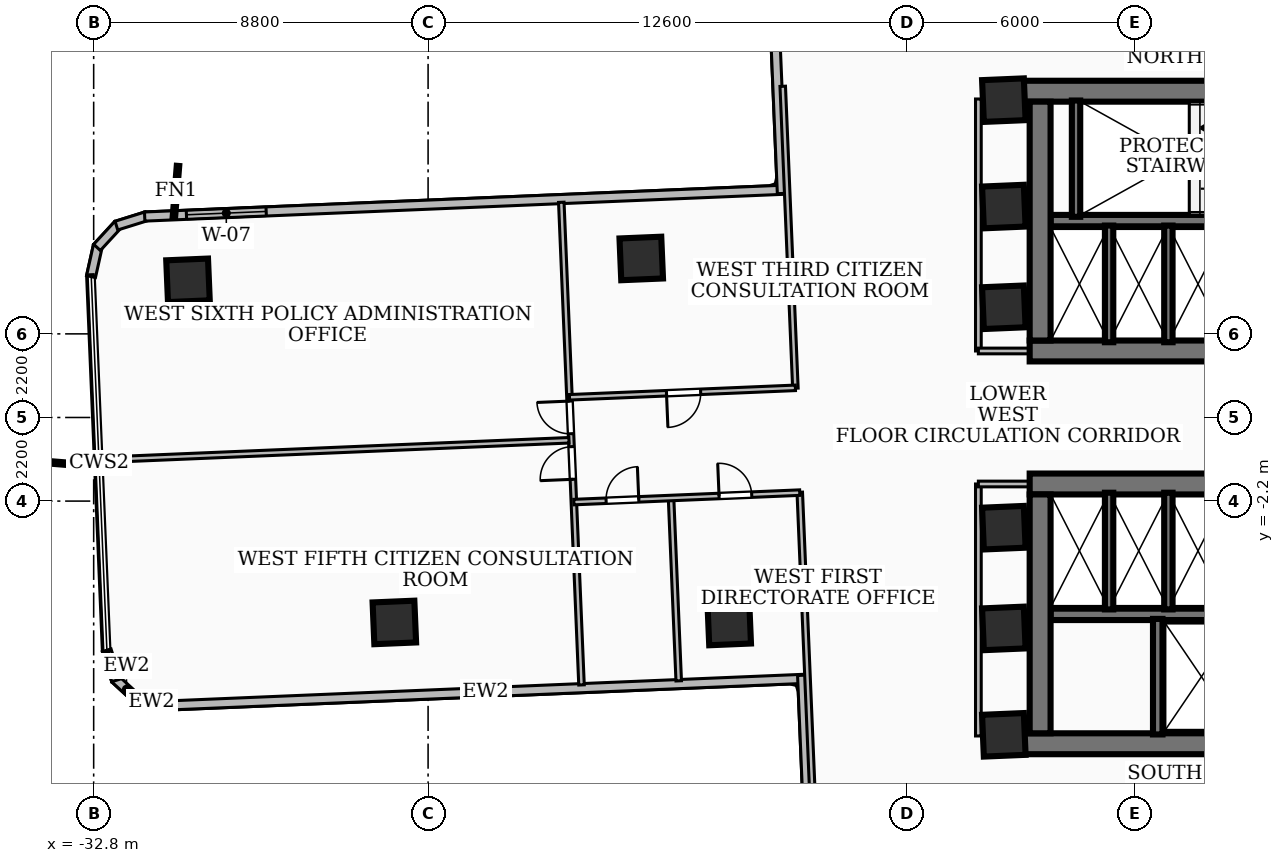
"""IFC4 building model, lengths in metres.
Left out: names, types, materials, properties, quantities, classifications, styles, units other than length and angle.
Written with IfcOpenShell. Run it as: python <this file> out.ifc"""

import sys

from ifc_helpers import new_model, si_unit, direction, frame, frame_2d, origin, origin_2d, place, context, subcontext, project, spatial, rectangle, extrude, element, fill, save


model = new_model("IFC4")
c1 = context("Model", 3, precision=1e-05, world=origin(), true_north=direction((0.0, 1.0)))
c2 = subcontext(c1, "Body", "Model", "MODEL_VIEW")
j1 = project(units=[si_unit("LENGTHUNIT", "METRE"), si_unit("PLANEANGLEUNIT", "RADIAN")], contexts=[c1])
p1 = place(None, origin())
s1 = spatial("IfcSite", under=j1, at=p1, CompositionType="ELEMENT")
p2 = place(p1, origin())
s2 = spatial("IfcBuilding", under=s1, at=p2, CompositionType="ELEMENT")
p3 = place(p2, frame((0.0, 0.0, 46.08)))
s3 = spatial("IfcBuildingStorey", under=s2, at=p3, CompositionType="ELEMENT", Elevation=46.08)
p4 = place(p3, frame((-8.78, 8.585, 0.0), z_axis=(0.0, 0.0, 1.0), x_axis=(1.0, 0.0, 0.0)))
e1 = element("IfcWall", 1, at=p4, inside=s3, PredefinedType="SHEAR", context=c2, shape_type="SweptSolid", body=[
    extrude(rectangle(XDim=17.56, YDim=0.55, at=frame_2d((8.78, 0.0))), origin(), (0.0, 0.0, 1.0), 3.32),
])
p5 = place(p3, frame((8.17, 1.75, 0.0), z_axis=(0.0, 0.0, 1.0), x_axis=(-1.0, 0.0, 0.0)))
e2 = element("IfcWall", 2, at=p5, inside=s3, PredefinedType="SHEAR", context=c2, shape_type="SweptSolid", body=[
    extrude(rectangle(XDim=16.34, YDim=0.55, at=frame_2d((8.17, 0.0))), origin(), (0.0, 0.0, 1.0), 3.32),
])
p6 = place(p5, frame((7.45, 0.0, 0.0)))
e3 = element("IfcOpeningElement", 3, at=p6, cuts=e2, PredefinedType="OPENING", context=c2, shape_type="SweptSolid", body=[
    extrude(rectangle(XDim=1.0, YDim=2.1, at=frame_2d((0.5, 1.05))), frame((0.0, 0.285, 0.0), z_axis=(0.0, -1.0, 0.0), x_axis=(1.0, 0.0, 0.0)), (0.0, 0.0, 1.0), 0.57),
])
p7 = place(p5, frame((3.4, 0.0, 0.0)))
e4 = element("IfcOpeningElement", 4, at=p7, cuts=e2, PredefinedType="OPENING", context=c2, shape_type="SweptSolid", body=[
    extrude(rectangle(XDim=0.9, YDim=2.06, at=frame_2d((0.45, 1.03))), frame((0.0, 0.285, 0.0), z_axis=(0.0, -1.0, 0.0), x_axis=(1.0, 0.0, 0.0)), (0.0, 0.0, 1.0), 0.57),
])
p8 = place(p5, frame((1.1, 0.0, 0.0)))
e5 = element("IfcOpeningElement", 5, at=p8, cuts=e2, PredefinedType="OPENING", context=c2, shape_type="SweptSolid", body=[
    extrude(rectangle(XDim=0.9, YDim=2.06, at=frame_2d((0.45, 1.03))), frame((0.0, 0.285, 0.0), z_axis=(0.0, -1.0, 0.0), x_axis=(1.0, 0.0, 0.0)), (0.0, 0.0, 1.0), 0.57),
])
p9 = place(p3, frame((-7.895, 2.025, 0.0), z_axis=(0.0, 0.0, 1.0), x_axis=(0.0, 1.0, 0.0)))
e6 = element("IfcWall", 6, at=p9, inside=s3, PredefinedType="SHEAR", context=c2, shape_type="SweptSolid", body=[
    extrude(rectangle(XDim=6.285, YDim=0.55, at=frame_2d((3.143, 0.0))), origin(), (0.0, 0.0, 1.0), 3.32),
])
p10 = place(p3, frame((7.62, 5.18, 0.0), z_axis=(0.0, 0.0, 1.0), x_axis=(-1.0, 0.0, 0.0)))
e7 = element("IfcWall", 7, at=p10, inside=s3, PredefinedType="SOLIDWALL", context=c2, shape_type="SweptSolid", body=[
    extrude(rectangle(XDim=15.24, YDim=0.3, at=frame_2d((7.62, 0.0))), origin(), (0.0, 0.0, 1.0), 3.32),
])
p11 = place(p10, frame((5.77, 0.0, 0.0)))
e8 = element("IfcOpeningElement", 8, at=p11, cuts=e7, PredefinedType="OPENING", context=c2, shape_type="SweptSolid", body=[
    extrude(rectangle(XDim=1.1, YDim=2.15, at=frame_2d((0.55, 1.075))), frame((0.0, 0.16, 0.0), z_axis=(0.0, -1.0, 0.0), x_axis=(1.0, 0.0, 0.0)), (0.0, 0.0, 1.0), 0.32),
])
p12 = place(p10, frame((2.97, 0.0, 0.0)))
e9 = element("IfcOpeningElement", 9, at=p12, cuts=e7, PredefinedType="OPENING", context=c2, shape_type="SweptSolid", body=[
    extrude(rectangle(XDim=1.1, YDim=2.15, at=frame_2d((0.55, 1.075))), frame((0.0, 0.16, 0.0), z_axis=(0.0, -1.0, 0.0), x_axis=(1.0, 0.0, 0.0)), (0.0, 0.0, 1.0), 0.32),
])
p13 = place(p10, frame((7.97, 0.0, 0.0)))
e10 = element("IfcOpeningElement", 10, at=p13, cuts=e7, PredefinedType="OPENING", context=c2, shape_type="SweptSolid", body=[
    extrude(rectangle(XDim=1.0, YDim=2.1, at=frame_2d((0.5, 1.05))), frame((0.0, 0.16, 0.0), z_axis=(0.0, -1.0, 0.0), x_axis=(1.0, 0.0, 0.0)), (0.0, 0.0, 1.0), 0.32),
])
p14 = place(p3, frame((8.78, -8.585, 0.0), z_axis=(0.0, 0.0, 1.0), x_axis=(-1.0, 0.0, 0.0)))
e11 = element("IfcWall", 11, at=p14, inside=s3, PredefinedType="SHEAR", context=c2, shape_type="SweptSolid", body=[
    extrude(rectangle(XDim=17.56, YDim=0.55, at=frame_2d((8.78, 0.0))), origin(), (0.0, 0.0, 1.0), 3.32),
])
p15 = place(p3, frame((-8.17, -1.75, 0.0), z_axis=(0.0, 0.0, 1.0), x_axis=(1.0, 0.0, 0.0)))
e12 = element("IfcWall", 12, at=p15, inside=s3, PredefinedType="SHEAR", context=c2, shape_type="SweptSolid", body=[
    extrude(rectangle(XDim=16.34, YDim=0.55, at=frame_2d((8.17, 0.0))), origin(), (0.0, 0.0, 1.0), 3.32),
])
p16 = place(p15, frame((7.45, 0.0, 0.0)))
e13 = element("IfcOpeningElement", 13, at=p16, cuts=e12, PredefinedType="OPENING", context=c2, shape_type="SweptSolid", body=[
    extrude(rectangle(XDim=1.0, YDim=2.1, at=frame_2d((0.5, 1.05))), frame((0.0, 0.285, 0.0), z_axis=(0.0, -1.0, 0.0), x_axis=(1.0, 0.0, 0.0)), (0.0, 0.0, 1.0), 0.57),
])
p17 = place(p15, frame((10.965, 0.0, 0.0)))
e14 = element("IfcOpeningElement", 14, at=p17, cuts=e12, PredefinedType="OPENING", context=c2, shape_type="SweptSolid", body=[
    extrude(rectangle(XDim=1.05, YDim=2.15, at=frame_2d((0.525, 1.075))), frame((0.0, 0.285, 0.0), z_axis=(0.0, -1.0, 0.0), x_axis=(1.0, 0.0, 0.0)), (0.0, 0.0, 1.0), 0.57),
])
p18 = place(p15, frame((12.525, 0.0, 0.0)))
e15 = element("IfcOpeningElement", 15, at=p18, cuts=e12, PredefinedType="OPENING", context=c2, shape_type="SweptSolid", body=[
    extrude(rectangle(XDim=1.05, YDim=2.15, at=frame_2d((0.525, 1.075))), frame((0.0, 0.285, 0.0), z_axis=(0.0, -1.0, 0.0), x_axis=(1.0, 0.0, 0.0)), (0.0, 0.0, 1.0), 0.57),
])
p19 = place(p15, frame((14.085, 0.0, 0.0)))
e16 = element("IfcOpeningElement", 16, at=p19, cuts=e12, PredefinedType="OPENING", context=c2, shape_type="SweptSolid", body=[
    extrude(rectangle(XDim=1.05, YDim=2.15, at=frame_2d((0.525, 1.075))), frame((0.0, 0.285, 0.0), z_axis=(0.0, -1.0, 0.0), x_axis=(1.0, 0.0, 0.0)), (0.0, 0.0, 1.0), 0.57),
])
p20 = place(p3, frame((-7.895, -8.31, 0.0), z_axis=(0.0, 0.0, 1.0), x_axis=(0.0, 1.0, 0.0)))
e17 = element("IfcWall", 17, at=p20, inside=s3, PredefinedType="SHEAR", context=c2, shape_type="SweptSolid", body=[
    extrude(rectangle(XDim=6.285, YDim=0.55, at=frame_2d((3.143, 0.0))), origin(), (0.0, 0.0, 1.0), 3.32),
])
p21 = place(p3, frame((-7.62, -5.18, 0.0), z_axis=(0.0, 0.0, 1.0), x_axis=(1.0, 0.0, 0.0)))
e18 = element("IfcWall", 18, at=p21, inside=s3, PredefinedType="SOLIDWALL", context=c2, shape_type="SweptSolid", body=[
    extrude(rectangle(XDim=15.24, YDim=0.3, at=frame_2d((7.62, 0.0))), origin(), (0.0, 0.0, 1.0), 3.32),
])
p22 = place(p21, frame((5.77, 0.0, 0.0)))
e19 = element("IfcOpeningElement", 19, at=p22, cuts=e18, PredefinedType="OPENING", context=c2, shape_type="SweptSolid", body=[
    extrude(rectangle(XDim=1.1, YDim=2.15, at=frame_2d((0.55, 1.075))), frame((0.0, 0.16, 0.0), z_axis=(0.0, -1.0, 0.0), x_axis=(1.0, 0.0, 0.0)), (0.0, 0.0, 1.0), 0.32),
])
p23 = place(p21, frame((7.97, 0.0, 0.0)))
e20 = element("IfcOpeningElement", 20, at=p23, cuts=e18, PredefinedType="OPENING", context=c2, shape_type="SweptSolid", body=[
    extrude(rectangle(XDim=1.0, YDim=2.1, at=frame_2d((0.5, 1.05))), frame((0.0, 0.16, 0.0), z_axis=(0.0, -1.0, 0.0), x_axis=(1.0, 0.0, 0.0)), (0.0, 0.0, 1.0), 0.32),
])
p24 = place(p3, frame((-6.95, 5.28, 0.0), z_axis=(0.0, 0.0, 1.0), x_axis=(0.0, 1.0, 0.0)))
e21 = element("IfcWall", 21, at=p24, inside=s3, PredefinedType="SOLIDWALL", context=c2, shape_type="SweptSolid", body=[
    extrude(rectangle(XDim=3.06, YDim=0.22, at=frame_2d((1.53, 0.0))), origin(), (0.0, 0.0, 1.0), 3.32),
])
p25 = place(p3, frame((-4.8, -8.34, 0.0), z_axis=(0.0, 0.0, 1.0), x_axis=(0.0, 1.0, 0.0)))
e22 = element("IfcWall", 22, at=p25, inside=s3, PredefinedType="SOLIDWALL", context=c2, shape_type="SweptSolid", body=[
    extrude(rectangle(XDim=3.04, YDim=0.25, at=frame_2d((1.52, 0.0))), origin(), (0.0, 0.0, 1.0), 3.32),
])
for number, where, z_axis, x_axis in (
    (23, (-6.08, 1.98, 0.0), (0.0, 0.0, 1.0), (0.0, 1.0, 0.0)),
    (24, (-4.52, 1.98, 0.0), (0.0, 0.0, 1.0), (0.0, 1.0, 0.0)),
    (25, (-6.08, -5.05, 0.0), (0.0, 0.0, 1.0), (0.0, 1.0, 0.0)),
    (26, (-4.52, -5.05, 0.0), (0.0, 0.0, 1.0), (0.0, 1.0, 0.0)),
):
    element("IfcWall", number, at=place(p3, frame(where, z_axis=z_axis, x_axis=x_axis)), inside=s3, PredefinedType="SOLIDWALL", context=c2, shape_type="SweptSolid", body=[
        extrude(rectangle(XDim=3.07, YDim=0.22, at=frame_2d((1.535, 0.0))), origin(), (0.0, 0.0, 1.0), 3.32),
    ])
for number, where, z_axis, x_axis in (
    (27, (-8.85, -5.55, 0.0), (0.0, 0.0, 1.0), (0.999, 0.042, 0.0)),
    (28, (-8.85, -2.9, 0.0), (0.0, 0.0, 1.0), (0.999, 0.042, 0.0)),
    (29, (-8.85, 2.9, 0.0), (0.0, 0.0, 1.0), (0.999, 0.042, 0.0)),
    (30, (-8.85, 5.55, 0.0), (0.0, 0.0, 1.0), (0.999, 0.042, 0.0)),
    (31, (-8.85, 8.35, 0.0), (0.0, 0.0, 1.0), (0.999, 0.042, 0.0)),
    (32, (-8.85, -8.35, 0.0), (0.0, 0.0, 1.0), (0.999, 0.042, 0.0)),
    (33, (-18.391, 4.184, 0.0), (0.0, 0.0, 1.0), (0.999, 0.042, 0.0)),
    (34, (-16.076, -5.421, 0.0), (0.0, 0.0, 1.0), (0.999, 0.042, 0.0)),
    (35, (-30.318, 3.609, 0.0), (0.0, 0.0, 1.0), (0.999, 0.042, 0.0)),
    (36, (-24.888, -5.393, 0.0), (0.0, 0.0, 1.0), (0.999, 0.042, 0.0)),
):
    element("IfcColumn", number, at=place(p3, frame(where, z_axis=z_axis, x_axis=x_axis)), inside=s3, PredefinedType="COLUMN", context=c2, shape_type="SweptSolid", body=[
        extrude(rectangle(XDim=1.1, YDim=1.1, at=origin_2d()), origin(), (0.0, 0.0, 1.0), 3.6),
    ])
p26 = place(p3, frame((-14.058, -6.875, 0.0), z_axis=(0.0, 0.0, 1.0), x_axis=(-0.999124376175, -0.04183874918, 0.0)))
e37 = element("IfcWall", 37, at=p26, inside=s3, PredefinedType="SOLIDWALL", context=c2, shape_type="SweptSolid", body=[
    extrude(rectangle(XDim=16.876, YDim=0.24, at=frame_2d((8.438, 0.0))), origin(), (0.0, 0.0, 1.0), 2.624),
])
p27 = place(p3, frame((-30.87, -7.585, 0.0), z_axis=(0.0, 0.0, 1.0), x_axis=(-0.976138507006, 0.217148831773, 0.0)))
e38 = element("IfcWall", 38, at=p27, inside=s3, PredefinedType="SOLIDWALL", context=c2, shape_type="SweptSolid", body=[
    extrude(rectangle(XDim=0.829, YDim=0.24, at=frame_2d((0.414, 0.0))), origin(), (0.0, 0.0, 1.0), 3.32),
])
p28 = place(p3, frame((-31.637, -7.427, 0.0), z_axis=(0.0, 0.0, 1.0), x_axis=(-0.73603262681, 0.676946063044, 0.0)))
e39 = element("IfcWall", 39, at=p28, inside=s3, PredefinedType="SOLIDWALL", context=c2, shape_type="SweptSolid", body=[
    extrude(rectangle(XDim=0.814, YDim=0.24, at=frame_2d((0.407, 0.0))), origin(), (0.0, 0.0, 1.0), 3.32),
])
p29 = place(p3, frame((-32.211, -6.917, 0.0), z_axis=(0.0, 0.0, 1.0), x_axis=(-0.297805793488, 0.954626476359, 0.0)))
e40 = element("IfcWall", 40, at=p29, inside=s3, PredefinedType="SOLIDWALL", context=c2, shape_type="SweptSolid", body=[
    extrude(rectangle(XDim=0.83, YDim=0.24, at=frame_2d((0.415, 0.0))), origin(), (0.0, 0.0, 1.0), 3.32),
])
p30 = place(p3, frame((-32.87, 3.707, 0.0), z_axis=(0.0, 0.0, 1.0), x_axis=(0.21711735544, 0.976145508604, 0.0)))
e41 = element("IfcWall", 41, at=p30, inside=s3, PredefinedType="SOLIDWALL", context=c2, shape_type="SweptSolid", body=[
    extrude(rectangle(XDim=0.83, YDim=0.24, at=frame_2d((0.415, 0.0))), origin(), (0.0, 0.0, 1.0), 3.32),
])
p31 = place(p3, frame((-32.712, 4.475, 0.0), z_axis=(0.0, 0.0, 1.0), x_axis=(0.677693750404, 0.735344259965, 0.0)))
e42 = element("IfcWall", 42, at=p31, inside=s3, PredefinedType="SOLIDWALL", context=c2, shape_type="SweptSolid", body=[
    extrude(rectangle(XDim=0.813, YDim=0.24, at=frame_2d((0.406, 0.0))), origin(), (0.0, 0.0, 1.0), 3.32),
])
p32 = place(p3, frame((-32.202, 5.048, 0.0), z_axis=(0.0, 0.0, 1.0), x_axis=(0.954814146828, 0.297203541393, 0.0)))
e43 = element("IfcWall", 43, at=p32, inside=s3, PredefinedType="SOLIDWALL", context=c2, shape_type="SweptSolid", body=[
    extrude(rectangle(XDim=0.831, YDim=0.24, at=frame_2d((0.415, 0.0))), origin(), (0.0, 0.0, 1.0), 3.32),
])
p33 = place(p3, frame((-31.458, 5.287, 0.0), z_axis=(0.0, 0.0, 1.0), x_axis=(0.999122484842, 0.041883890494, 0.0)))
e44 = element("IfcWall", 44, at=p33, inside=s3, PredefinedType="SOLIDWALL", context=c2, shape_type="SweptSolid", body=[
    extrude(rectangle(XDim=16.875, YDim=0.24, at=frame_2d((8.438, 0.0))), origin(), (0.0, 0.0, 1.0), 3.32),
])
p34 = place(p33, frame((1.1, 0.0, 0.85)))
e45 = element("IfcOpeningElement", 45, at=p34, cuts=e44, PredefinedType="OPENING", context=c2, shape_type="SweptSolid", body=[
    extrude(rectangle(XDim=2.1, YDim=1.8, at=frame_2d((1.05, 0.9))), frame((0.0, 0.13, 0.0), z_axis=(0.0, -1.0, 0.0), x_axis=(1.0, 0.0, 0.0)), (0.0, 0.0, 1.0), 0.26),
])
p35 = place(p3, frame((-14.69, 5.894, 0.0), z_axis=(0.0, 0.0, 1.0), x_axis=(-0.041827173477, 0.999124860845, 0.0)))
e46 = element("IfcWall", 46, at=p35, inside=s3, PredefinedType="SOLIDWALL", context=c2, shape_type="SweptSolid", body=[
    extrude(rectangle(XDim=6.456, YDim=0.24, at=frame_2d((3.228, 0.0))), origin(), (0.0, 0.0, 1.0), 3.32),
])
p36 = place(p3, frame((-13.875, -13.552, 0.0), z_axis=(0.0, 0.0, 1.0), x_axis=(-0.041765444226, 0.999127443157, 0.0)))
e47 = element("IfcWall", 47, at=p36, inside=s3, PredefinedType="SOLIDWALL", context=c2, shape_type="SweptSolid", body=[
    extrude(rectangle(XDim=6.775, YDim=0.24, at=frame_2d((3.387, 0.0))), origin(), (0.0, 0.0, 1.0), 2.624),
])
p37 = place(p3, frame((-9.52, 1.75, 0.0), z_axis=(0.0, 0.0, 1.0), x_axis=(0.0, 1.0, 0.0)))
e48 = element("IfcWall", 48, at=p37, inside=s3, PredefinedType="PARTITIONING", context=c2, shape_type="SweptSolid", body=[
    extrude(rectangle(XDim=6.63, YDim=0.15, at=frame_2d((3.315, 0.0))), origin(), (0.0, 0.0, 1.0), 2.401),
])
p38 = place(p3, frame((-7.85, 1.75, 0.0), z_axis=(0.0, 0.0, 1.0), x_axis=(-1.0, 0.0, 0.0)))
e49 = element("IfcWall", 49, at=p38, inside=s3, PredefinedType="PARTITIONING", context=c2, shape_type="SweptSolid", body=[
    extrude(rectangle(XDim=1.67, YDim=0.15, at=frame_2d((0.835, 0.0))), origin(), (0.0, 0.0, 1.0), 2.385),
])
p39 = place(p3, frame((-9.52, -8.38, 0.0), z_axis=(0.0, 0.0, 1.0), x_axis=(0.0, 1.0, 0.0)))
e50 = element("IfcWall", 50, at=p39, inside=s3, PredefinedType="PARTITIONING", context=c2, shape_type="SweptSolid", body=[
    extrude(rectangle(XDim=6.63, YDim=0.15, at=frame_2d((3.315, 0.0))), origin(), (0.0, 0.0, 1.0), 2.401),
])
p40 = place(p3, frame((-7.85, -1.75, 0.0), z_axis=(0.0, 0.0, 1.0), x_axis=(-1.0, 0.0, 0.0)))
e51 = element("IfcWall", 51, at=p40, inside=s3, PredefinedType="PARTITIONING", context=c2, shape_type="SweptSolid", body=[
    extrude(rectangle(XDim=1.67, YDim=0.15, at=frame_2d((0.835, 0.0))), origin(), (0.0, 0.0, 1.0), 2.385),
])
p41 = place(p3, frame((-14.22, -1.967, 0.0), z_axis=(0.0, 0.0, 1.0), x_axis=(0.041948565382, -0.99911977153, 0.0)))
e52 = element("IfcWall", 52, at=p41, inside=s3, PredefinedType="PARTITIONING", context=c2, shape_type="SweptSolid", body=[
    extrude(rectangle(XDim=8.27, YDim=0.145, at=frame_2d((4.135, 0.0))), origin(), (0.0, 0.0, 1.0), 2.401),
])
p42 = place(p3, frame((-14.668, 8.714, 0.0), z_axis=(0.0, 0.0, 1.0), x_axis=(0.041882146625, -0.999122557945, 0.0)))
e53 = element("IfcWall", 53, at=p42, inside=s3, PredefinedType="PARTITIONING", context=c2, shape_type="SweptSolid", body=[
    extrude(rectangle(XDim=7.951, YDim=0.145, at=frame_2d((3.976, 0.0))), origin(), (0.0, 0.0, 1.0), 2.401),
])
p43 = place(p3, frame((-17.606, -2.139, 0.0), z_axis=(0.0, 0.0, 1.0), x_axis=(0.041901609945, -0.999121741873, 0.0)))
e54 = element("IfcWall", 54, at=p43, inside=s3, PredefinedType="PARTITIONING", context=c2, shape_type="SweptSolid", body=[
    extrude(rectangle(XDim=4.795, YDim=0.145, at=frame_2d((2.397, 0.0))), origin(), (0.0, 0.0, 1.0), 2.401),
])
p44 = place(p3, frame((-20.164, -2.226, 0.0), z_axis=(0.0, 0.0, 1.0), x_axis=(0.999123588206, 0.041857561916, 0.0)))
e55 = element("IfcWall", 55, at=p44, inside=s3, PredefinedType="PARTITIONING", context=c2, shape_type="SweptSolid", body=[
    extrude(rectangle(XDim=5.949, YDim=0.145, at=frame_2d((2.975, 0.0))), origin(), (0.0, 0.0, 1.0), 3.32),
])
p45 = place(p44, frame((3.824, 0.0, 0.0)))
e56 = element("IfcOpeningElement", 56, at=p45, cuts=e55, PredefinedType="OPENING", context=c2, shape_type="SweptSolid", body=[
    extrude(rectangle(XDim=0.86, YDim=2.04, at=frame_2d((0.43, 1.02))), frame((0.0, 0.083, 0.0), z_axis=(0.0, -1.0, 0.0), x_axis=(1.0, 0.0, 0.0)), (0.0, 0.0, 1.0), 0.165),
])
p46 = place(p44, frame((0.849, 0.0, 0.0)))
e57 = element("IfcOpeningElement", 57, at=p46, cuts=e55, PredefinedType="OPENING", context=c2, shape_type="SweptSolid", body=[
    extrude(rectangle(XDim=0.86, YDim=2.04, at=frame_2d((0.43, 1.02))), frame((0.0, 0.083, 0.0), z_axis=(0.0, -1.0, 0.0), x_axis=(1.0, 0.0, 0.0)), (0.0, 0.0, 1.0), 0.165),
])
p47 = place(p3, frame((-14.335, 0.78, 0.0), z_axis=(0.0, 0.0, 1.0), x_axis=(-0.999123875731, -0.041850698257, 0.0)))
e58 = element("IfcWall", 58, at=p47, inside=s3, PredefinedType="PARTITIONING", context=c2, shape_type="SweptSolid", body=[
    extrude(rectangle(XDim=5.95, YDim=0.145, at=frame_2d((2.975, 0.0))), origin(), (0.0, 0.0, 1.0), 3.32),
])
p48 = place(p47, frame((2.495, 0.0, 0.0)))
e59 = element("IfcOpeningElement", 59, at=p48, cuts=e58, PredefinedType="OPENING", context=c2, shape_type="SweptSolid", body=[
    extrude(rectangle(XDim=0.9, YDim=2.06, at=frame_2d((0.45, 1.03))), frame((0.0, 0.083, 0.0), z_axis=(0.0, -1.0, 0.0), x_axis=(1.0, 0.0, 0.0)), (0.0, 0.0, 1.0), 0.165),
])
p49 = place(p3, frame((-20.293, -0.6, 0.0), z_axis=(0.0, 0.0, 1.0), x_axis=(-0.9991226833, -0.041879156098, 0.0)))
e60 = element("IfcWall", 60, at=p49, inside=s3, PredefinedType="PARTITIONING", context=c2, shape_type="SweptSolid", body=[
    extrude(rectangle(XDim=12.295, YDim=0.145, at=frame_2d((6.147, 0.0))), origin(), (0.0, 0.0, 1.0), 2.812),
])
p50 = place(p3, frame((-19.963, -7.037, 0.0), z_axis=(0.0, 0.0, 1.0), x_axis=(-0.041873423051, 0.999122923589, 0.0)))
e61 = element("IfcWall", 61, at=p50, inside=s3, PredefinedType="PARTITIONING", context=c2, shape_type="SweptSolid", body=[
    extrude(rectangle(XDim=12.71, YDim=0.145, at=frame_2d((6.355, 0.0))), origin(), (0.0, 0.0, 1.0), 2.401),
])
p51 = place(p50, frame((6.615, 0.0, 0.0)))
e62 = element("IfcOpeningElement", 62, at=p51, cuts=e61, PredefinedType="OPENING", context=c2, shape_type="SweptSolid", body=[
    extrude(rectangle(XDim=0.86, YDim=2.04, at=frame_2d((0.43, 1.02))), frame((0.0, 0.083, 0.0), z_axis=(0.0, -1.0, 0.0), x_axis=(1.0, 0.0, 0.0)), (0.0, 0.0, 1.0), 0.165),
])
p52 = place(p50, frame((5.415, 0.0, 0.0)))
e63 = element("IfcOpeningElement", 63, at=p52, cuts=e61, PredefinedType="OPENING", context=c2, shape_type="SweptSolid", body=[
    extrude(rectangle(XDim=0.86, YDim=2.04, at=frame_2d((0.43, 1.02))), frame((0.0, 0.083, 0.0), z_axis=(0.0, -1.0, 0.0), x_axis=(1.0, 0.0, 0.0)), (0.0, 0.0, 1.0), 0.165),
])
p53 = place(p34, origin())
e64 = element("IfcWindow", 64, at=p53, inside=s3, PartitioningType="SINGLE_PANEL", PredefinedType="WINDOW", context=c2, shape_type="SweptSolid", body=[
    extrude(rectangle(XDim=2.1, YDim=1.8, at=frame_2d((1.05, 0.9))), frame((0.0, 0.03, 0.0), z_axis=(0.0, -1.0, 0.0), x_axis=(1.0, 0.0, 0.0)), (0.0, 0.0, 1.0), 0.06),
])
fill(e45, e64)
p54 = place(p45, origin())
e65 = element("IfcDoor", 65, at=p54, inside=s3, OperationType="SINGLE_SWING_LEFT", PredefinedType="DOOR", context=c2, shape_type="SweptSolid", body=[
    extrude(rectangle(XDim=0.86, YDim=2.04, at=frame_2d((0.43, 1.02))), frame((0.0, 0.025, 0.0), z_axis=(0.0, -1.0, 0.0), x_axis=(1.0, 0.0, 0.0)), (0.0, 0.0, 1.0), 0.05),
])
fill(e56, e65)
p55 = place(p46, origin())
e66 = element("IfcDoor", 66, at=p55, inside=s3, OperationType="SINGLE_SWING_RIGHT", PredefinedType="DOOR", context=c2, shape_type="SweptSolid", body=[
    extrude(rectangle(XDim=0.86, YDim=2.04, at=frame_2d((0.43, 1.02))), frame((0.0, 0.025, 0.0), z_axis=(0.0, -1.0, 0.0), x_axis=(1.0, 0.0, 0.0)), (0.0, 0.0, 1.0), 0.05),
])
fill(e57, e66)
p56 = place(p48, origin())
e67 = element("IfcDoor", 67, at=p56, inside=s3, OperationType="SINGLE_SWING_RIGHT", PredefinedType="DOOR", context=c2, shape_type="SweptSolid", body=[
    extrude(rectangle(XDim=0.9, YDim=2.06, at=frame_2d((0.45, 1.03))), frame((0.0, 0.025, 0.0), z_axis=(0.0, -1.0, 0.0), x_axis=(1.0, 0.0, 0.0)), (0.0, 0.0, 1.0), 0.05),
])
fill(e59, e67)
p57 = place(p51, origin())
e68 = element("IfcDoor", 68, at=p57, inside=s3, OperationType="SINGLE_SWING_RIGHT", PredefinedType="DOOR", context=c2, shape_type="SweptSolid", body=[
    extrude(rectangle(XDim=0.86, YDim=2.04, at=frame_2d((0.43, 1.02))), frame((0.0, 0.025, 0.0), z_axis=(0.0, -1.0, 0.0), x_axis=(1.0, 0.0, 0.0)), (0.0, 0.0, 1.0), 0.05),
])
fill(e62, e68)
p58 = place(p52, origin())
e69 = element("IfcDoor", 69, at=p58, inside=s3, OperationType="SINGLE_SWING_LEFT", PredefinedType="DOOR", context=c2, shape_type="SweptSolid", body=[
    extrude(rectangle(XDim=0.86, YDim=2.04, at=frame_2d((0.43, 1.02))), frame((0.0, 0.025, 0.0), z_axis=(0.0, -1.0, 0.0), x_axis=(1.0, 0.0, 0.0)), (0.0, 0.0, 1.0), 0.05),
])
fill(e63, e69)
save(model, sys.argv[1])
